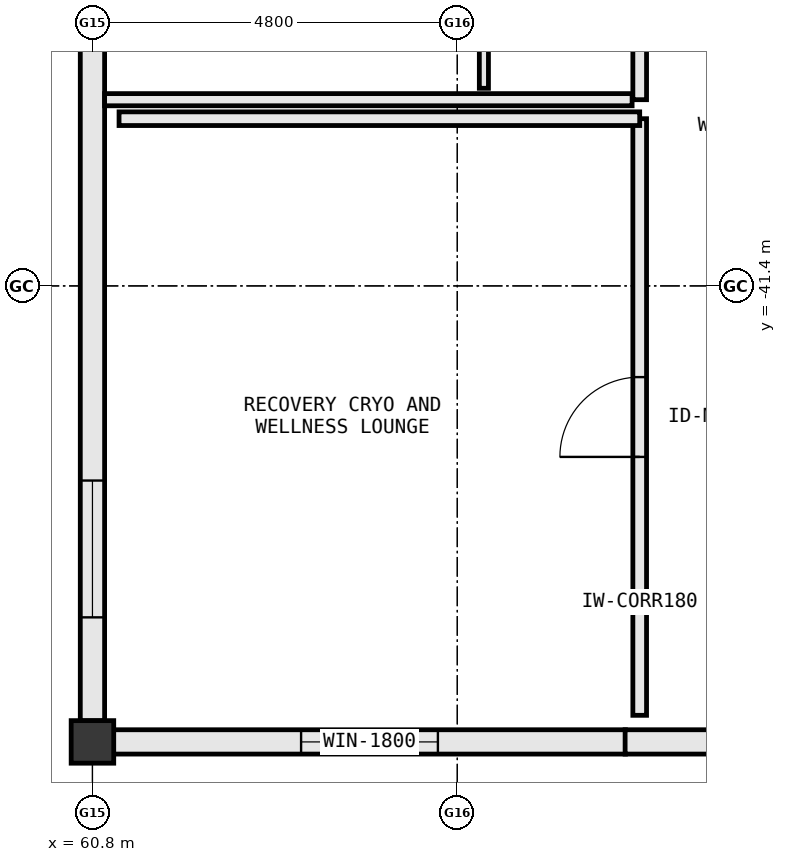
"""IFC4 building model, lengths in metres.
Left out: names, types, materials, properties, quantities, classifications, styles, units other than length and angle.
Written with IfcOpenShell. Run it as: python <this file> out.ifc"""

import sys

from ifc_helpers import new_model, si_unit, direction, frame, frame_2d, origin, origin_2d, place, context, subcontext, project, spatial, rectangle, extrude, element, fill, save


model = new_model("IFC4")
c1 = context("Model", 3, precision=1e-05, world=origin(), true_north=direction((0.0, 1.0)))
c2 = subcontext(c1, "Body", "Model", "MODEL_VIEW")
j1 = project(units=[si_unit("LENGTHUNIT", "METRE"), si_unit("PLANEANGLEUNIT", "RADIAN")], contexts=[c1])
p1 = place(None, origin())
s1 = spatial("IfcSite", under=j1, at=p1, CompositionType="ELEMENT")
p2 = place(p1, origin())
s2 = spatial("IfcBuilding", under=s1, at=p2, CompositionType="ELEMENT")
p3 = place(p2, frame((0.0, 0.0, 20.0)))
s3 = spatial("IfcBuildingStorey", under=s2, at=p3, CompositionType="ELEMENT", Elevation=20.0)
p4 = place(p3, frame((60.8, -47.4, 0.0), z_axis=(0.0, 0.0, 1.0), x_axis=(1.0, 0.0, 0.0)))
e1 = element("IfcColumn", 1, at=p4, inside=s3, PredefinedType="COLUMN", context=c2, shape_type="SweptSolid", body=[
    extrude(rectangle(XDim=0.56, YDim=0.56, at=origin_2d()), origin(), (0.0, 0.0, 1.0), 3.8),
])
p5 = place(p3, frame((61.078, -47.4, 0.0), z_axis=(0.0, 0.0, 1.0), x_axis=(1.0, 0.0, 0.0)))
e2 = element("IfcWall", 2, at=p5, inside=s3, PredefinedType="STANDARD", context=c2, shape_type="SweptSolid", body=[
    extrude(rectangle(XDim=6.734, YDim=0.32, at=frame_2d((3.367, 0.0))), origin(), (0.0, 0.0, 1.0), 2.685),
])
p6 = place(p5, frame((2.467, 0.0, 0.695)))
e3 = element("IfcOpeningElement", 3, at=p6, cuts=e2, PredefinedType="OPENING", context=c2, shape_type="SweptSolid", body=[
    extrude(rectangle(XDim=1.8, YDim=1.85, at=frame_2d((0.9, 0.925))), frame((0.0, 0.172, 0.0), z_axis=(0.0, -1.0, 0.0), x_axis=(1.0, 0.0, 0.0)), (0.0, 0.0, 1.0), 0.344),
])
p7 = place(p3, frame((67.808, -47.4, 0.0), z_axis=(0.0, 0.0, 1.0), x_axis=(1.0, 0.0, 0.0)))
e4 = element("IfcWall", 4, at=p7, inside=s3, PredefinedType="STANDARD", context=c2, shape_type="SweptSolid", body=[
    extrude(rectangle(XDim=6.734, YDim=0.32, at=frame_2d((3.367, 0.0))), origin(), (0.0, 0.0, 1.0), 2.685),
])
p8 = place(p3, frame((60.8, -38.078, 0.0), z_axis=(0.0, 0.0, 1.0), x_axis=(0.0, -1.0, 0.0)))
e5 = element("IfcWall", 5, at=p8, inside=s3, PredefinedType="STANDARD", context=c2, shape_type="SweptSolid", body=[
    extrude(rectangle(XDim=9.044, YDim=0.32, at=frame_2d((4.522, 0.0))), origin(), (0.0, 0.0, 1.0), 2.905),
])
p9 = place(p8, frame((5.883, 0.0, 0.85)))
e6 = element("IfcOpeningElement", 6, at=p9, cuts=e5, PredefinedType="OPENING", context=c2, shape_type="SweptSolid", body=[
    extrude(rectangle(XDim=1.8, YDim=1.85, at=frame_2d((0.9, 0.925))), frame((0.0, 0.172, 0.0), z_axis=(0.0, -1.0, 0.0), x_axis=(1.0, 0.0, 0.0)), (0.0, 0.0, 1.0), 0.344),
])
p10 = place(p3, frame((68.0, -47.05, 0.0), z_axis=(0.0, 0.0, 1.0), x_axis=(0.0, 1.0, 0.0)))
e7 = element("IfcWall", 7, at=p10, inside=s3, PredefinedType="PARTITIONING", context=c2, shape_type="SweptSolid", body=[
    extrude(rectangle(XDim=7.85, YDim=0.18, at=frame_2d((3.925, 0.0))), origin(), (0.0, 0.0, 1.0), 3.55),
])
p11 = place(p10, frame((3.4, 0.0, 0.0)))
e8 = element("IfcOpeningElement", 8, at=p11, cuts=e7, PredefinedType="OPENING", context=c2, shape_type="SweptSolid", body=[
    extrude(rectangle(XDim=1.05, YDim=2.2, at=frame_2d((0.525, 1.1))), frame((0.0, 0.102, 0.0), z_axis=(0.0, -1.0, 0.0), x_axis=(1.0, 0.0, 0.0)), (0.0, 0.0, 1.0), 0.204),
])
p12 = place(p3, frame((68.0, -39.2, 0.0), z_axis=(0.0, 0.0, 1.0), x_axis=(-1.0, 0.0, 0.0)))
e9 = element("IfcWall", 9, at=p12, inside=s3, PredefinedType="PARTITIONING", context=c2, shape_type="SweptSolid", body=[
    extrude(rectangle(XDim=6.85, YDim=0.18, at=frame_2d((3.425, 0.0))), origin(), (0.0, 0.0, 1.0), 3.55),
])
p13 = place(p3, frame((68.0, -38.95, 0.0), z_axis=(0.0, 0.0, 1.0), x_axis=(0.0, 1.0, 0.0)))
e10 = element("IfcWall", 10, at=p13, inside=s3, PredefinedType="PARTITIONING", context=c2, shape_type="SweptSolid", body=[
    extrude(rectangle(XDim=3.32, YDim=0.18, at=frame_2d((1.66, 0.0))), origin(), (0.0, 0.0, 1.0), 3.55),
])
p14 = place(p13, frame((2.04, 0.0, 0.0)))
e11 = element("IfcOpeningElement", 11, at=p14, cuts=e10, PredefinedType="OPENING", context=c2, shape_type="SweptSolid", body=[
    extrude(rectangle(XDim=1.0, YDim=2.2, at=frame_2d((0.5, 1.1))), frame((0.0, 0.102, 0.0), z_axis=(0.0, -1.0, 0.0), x_axis=(1.0, 0.0, 0.0)), (0.0, 0.0, 1.0), 0.204),
])
p15 = place(p3, frame((60.96, -38.95, 0.0), z_axis=(0.0, 0.0, 1.0), x_axis=(1.0, 0.0, 0.0)))
e12 = element("IfcWall", 12, at=p15, inside=s3, PredefinedType="PARTITIONING", context=c2, shape_type="SweptSolid", body=[
    extrude(rectangle(XDim=6.94, YDim=0.16, at=frame_2d((3.47, 0.0))), origin(), (0.0, 0.0, 1.0), 3.55),
])
p16 = place(p3, frame((65.95, -38.8, 0.0), z_axis=(0.0, 0.0, 1.0), x_axis=(0.0, 1.0, 0.0)))
e13 = element("IfcWall", 13, at=p16, inside=s3, PredefinedType="PARTITIONING", context=c2, shape_type="SweptSolid", body=[
    extrude(rectangle(XDim=1.75, YDim=0.12, at=frame_2d((0.875, 0.0))), origin(), (0.0, 0.0, 1.0), 2.905),
])
p17 = place(p6, origin())
e14 = element("IfcWindow", 14, at=p17, inside=s3, PartitioningType="SINGLE_PANEL", PredefinedType="WINDOW", context=c2, shape_type="SweptSolid", body=[
    extrude(rectangle(XDim=1.8, YDim=1.85, at=frame_2d((0.9, 0.925))), frame((0.0, 0.03, 0.0), z_axis=(0.0, -1.0, 0.0), x_axis=(1.0, 0.0, 0.0)), (0.0, 0.0, 1.0), 0.06),
])
fill(e3, e14)
p18 = place(p9, origin())
e15 = element("IfcWindow", 15, at=p18, inside=s3, PartitioningType="SINGLE_PANEL", PredefinedType="WINDOW", context=c2, shape_type="SweptSolid", body=[
    extrude(rectangle(XDim=1.8, YDim=1.85, at=frame_2d((0.9, 0.925))), frame((0.0, 0.03, 0.0), z_axis=(0.0, -1.0, 0.0), x_axis=(1.0, 0.0, 0.0)), (0.0, 0.0, 1.0), 0.06),
])
fill(e6, e15)
p19 = place(p11, origin())
e16 = element("IfcDoor", 16, at=p19, inside=s3, OperationType="SINGLE_SWING_LEFT", PredefinedType="DOOR", context=c2, shape_type="SweptSolid", body=[
    extrude(rectangle(XDim=1.05, YDim=2.2, at=frame_2d((0.525, 1.1))), frame((0.0, 0.025, 0.0), z_axis=(0.0, -1.0, 0.0), x_axis=(1.0, 0.0, 0.0)), (0.0, 0.0, 1.0), 0.05),
])
fill(e8, e16)
save(model, sys.argv[1])
